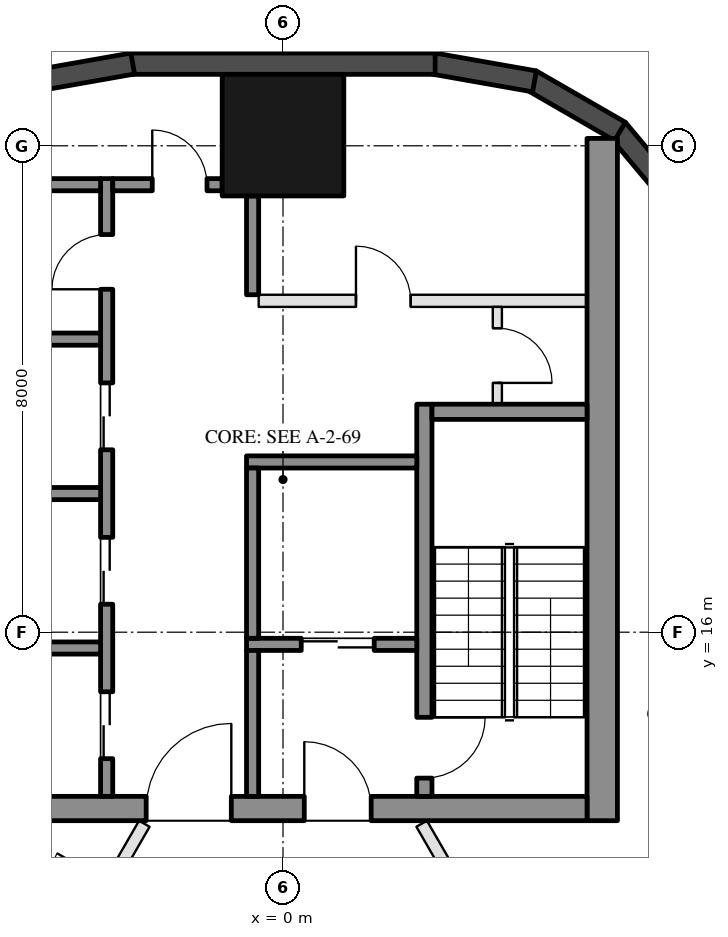
"""IFC4 building model, lengths in metres.
Left out: names, types, materials, properties, quantities, classifications, styles, units other than length and angle.
Written with IfcOpenShell. Run it as: python <this file> out.ifc"""

import sys

from ifc_helpers import new_model, si_unit, direction, frame, frame_2d, origin, origin_2d, place, context, subcontext, project, spatial, rectangle, hollow_rectangle, extrude, boolean, halfspace, element, fill, save


model = new_model("IFC4")
c1 = context("Model", 3, precision=1e-05, world=origin(), true_north=direction((0.0, 1.0)))
c2 = subcontext(c1, "Body", "Model", "MODEL_VIEW")
j1 = project(units=[si_unit("LENGTHUNIT", "METRE"), si_unit("PLANEANGLEUNIT", "RADIAN")], contexts=[c1])
p1 = place(None, origin())
s1 = spatial("IfcSite", under=j1, at=p1, CompositionType="ELEMENT")
p2 = place(p1, origin())
s2 = spatial("IfcBuilding", under=s1, at=p2, CompositionType="ELEMENT")
p3 = place(p2, frame((0.0, 0.0, 298.5)))
s3 = spatial("IfcBuildingStorey", under=s2, at=p3, CompositionType="ELEMENT", Elevation=298.5)
p4 = place(p3, frame((0.0, 24.175, 0.0), z_axis=(0.0, -0.21982618752, 0.975539054718), x_axis=(1.0, 0.0, 0.0)))
e1 = element("IfcColumn", 1, at=p4, inside=s3, PredefinedType="COLUMN", context=c2, shape_type="SweptSolid", body=[
    boolean("DIFFERENCE", boolean("DIFFERENCE", extrude(hollow_rectangle(XDim=2.0, YDim=2.0, WallThickness=0.05, at=origin_2d()), origin(), (0.0, 0.0, 1.0), 3.793), halfspace(frame((0.0, 0.0, 0.113), z_axis=(0.0, 0.0, 1.0), x_axis=(1.0, 0.0, 0.0)), True)), halfspace(frame((0.0, 0.0, 3.679), z_axis=(0.0, 0.0, 1.0), x_axis=(1.0, 0.0, 0.0)), False)),
])
for number, where, z_axis, x_axis in (
    (2, (6.581, 22.98, 0.0), (0.0, 0.0, 1.0), (-0.643, 0.766, 0.0)),
    (3, (5.542, 24.236, 0.0), (0.0, 0.0, 1.0), (-0.866, 0.5, 0.0)),
    (4, (4.135, 25.059, 0.0), (0.0, 0.0, 1.0), (-0.985, 0.174, 0.0)),
):
    element("IfcWall", number, at=place(p3, frame(where, z_axis=z_axis, x_axis=x_axis)), inside=s3, PredefinedType="SOLIDWALL", context=c2, shape_type="SweptSolid", body=[
        extrude(rectangle(XDim=1.689, YDim=0.35, at=frame_2d((0.845, 0.0))), origin(), (0.0, 0.0, 1.0), 3.55),
    ])
p5 = place(p3, frame((2.502, 25.35, 0.0), z_axis=(0.0, 0.0, 1.0), x_axis=(-1.0, 0.0, 0.0)))
e5 = element("IfcWall", 5, at=p5, inside=s3, PredefinedType="SOLIDWALL", context=c2, shape_type="SweptSolid", body=[
    extrude(rectangle(XDim=5.004, YDim=0.35, at=frame_2d((2.502, 0.0))), origin(), (0.0, 0.0, 1.0), 3.55),
])
p6 = place(p3, frame((-2.472, 25.353, 0.0), z_axis=(0.0, 0.0, 1.0), x_axis=(-0.984799556842, -0.173694654046, 0.0)))
e6 = element("IfcWall", 6, at=p6, inside=s3, PredefinedType="SOLIDWALL", context=c2, shape_type="SweptSolid", body=[
    extrude(rectangle(XDim=1.689, YDim=0.35, at=frame_2d((0.845, 0.0))), origin(), (0.0, 0.0, 1.0), 3.55),
])
p7 = place(p3, frame((5.25, 12.9, 0.0), z_axis=(0.0, 0.0, 1.0), x_axis=(0.0, 1.0, 0.0)))
e7 = element("IfcWall", 7, at=p7, inside=s3, PredefinedType="SHEAR", context=c2, shape_type="SweptSolid", body=[
    extrude(rectangle(XDim=11.222, YDim=0.5, at=frame_2d((5.611, 0.0))), origin(), (0.0, 0.0, 1.0), 3.5),
])
p8 = place(p3, frame((5.0, 13.1, 0.0), z_axis=(0.0, 0.0, 1.0), x_axis=(-1.0, 0.0, 0.0)))
e8 = element("IfcWall", 8, at=p8, inside=s3, PredefinedType="SHEAR", context=c2, shape_type="SweptSolid", body=[
    extrude(rectangle(XDim=10.0, YDim=0.4, at=frame_2d((5.0, 0.0))), origin(), (0.0, 0.0, 1.0), 3.5),
])
p9 = place(p8, frame((3.55, 0.0, 0.0)))
e9 = element("IfcOpeningElement", 9, at=p9, cuts=e8, PredefinedType="OPENING", context=c2, shape_type="SweptSolid", body=[
    extrude(rectangle(XDim=1.1, YDim=2.1, at=frame_2d((0.55, 1.05))), frame((0.0, 0.21, 0.0), z_axis=(0.0, -1.0, 0.0), x_axis=(1.0, 0.0, 0.0)), (0.0, 0.0, 1.0), 0.42),
])
p10 = place(p8, frame((5.85, 0.0, 0.0)))
e10 = element("IfcOpeningElement", 10, at=p10, cuts=e8, PredefinedType="OPENING", context=c2, shape_type="SweptSolid", body=[
    extrude(rectangle(XDim=1.4, YDim=2.1, at=frame_2d((0.7, 1.05))), frame((0.0, 0.21, 0.0), z_axis=(0.0, -1.0, 0.0), x_axis=(1.0, 0.0, 0.0)), (0.0, 0.0, 1.0), 0.42),
])
p11 = place(p3, frame((2.325, 13.3, 0.0), z_axis=(0.0, 0.0, 1.0), x_axis=(0.0, 1.0, 0.0)))
e11 = element("IfcWall", 11, at=p11, inside=s3, PredefinedType="SHEAR", context=c2, shape_type="SweptSolid", body=[
    extrude(rectangle(XDim=6.45, YDim=0.25, at=frame_2d((3.225, 0.0))), origin(), (0.0, 0.0, 1.0), 3.5),
])
p12 = place(p11, frame((0.3, 0.0, 0.0)))
e12 = element("IfcOpeningElement", 12, at=p12, cuts=e11, PredefinedType="OPENING", context=c2, shape_type="SweptSolid", body=[
    extrude(rectangle(XDim=1.0, YDim=2.1, at=frame_2d((0.5, 1.05))), frame((0.0, 0.135, 0.0), z_axis=(0.0, -1.0, 0.0), x_axis=(1.0, 0.0, 0.0)), (0.0, 0.0, 1.0), 0.27),
])
p13 = place(p3, frame((5.0, 19.625, 0.0), z_axis=(0.0, 0.0, 1.0), x_axis=(-1.0, 0.0, 0.0)))
e13 = element("IfcWall", 13, at=p13, inside=s3, PredefinedType="SHEAR", context=c2, shape_type="SweptSolid", body=[
    extrude(rectangle(XDim=2.55, YDim=0.25, at=frame_2d((1.275, 0.0))), origin(), (0.0, 0.0, 1.0), 3.5),
])
p14 = place(p3, frame((2.2, 18.8, 0.0), z_axis=(0.0, 0.0, 1.0), x_axis=(-1.0, 0.0, 0.0)))
e14 = element("IfcWall", 14, at=p14, inside=s3, PredefinedType="SHEAR", context=c2, shape_type="SweptSolid", body=[
    extrude(rectangle(XDim=2.8, YDim=0.2, at=frame_2d((1.4, 0.0))), origin(), (0.0, 0.0, 1.0), 3.5),
])
p15 = place(p3, frame((2.2, 15.8, 0.0), z_axis=(0.0, 0.0, 1.0), x_axis=(-1.0, 0.0, 0.0)))
e15 = element("IfcWall", 15, at=p15, inside=s3, PredefinedType="SHEAR", context=c2, shape_type="SweptSolid", body=[
    extrude(rectangle(XDim=2.8, YDim=0.2, at=frame_2d((1.4, 0.0))), origin(), (0.0, 0.0, 1.0), 3.5),
])
p16 = place(p15, frame((0.7, 0.0, 0.0)))
e16 = element("IfcOpeningElement", 16, at=p16, cuts=e15, PredefinedType="OPENING", context=c2, shape_type="SweptSolid", body=[
    extrude(rectangle(XDim=1.2, YDim=2.1, at=frame_2d((0.6, 1.05))), frame((0.0, 0.11, 0.0), z_axis=(0.0, -1.0, 0.0), x_axis=(1.0, 0.0, 0.0)), (0.0, 0.0, 1.0), 0.22),
])
p17 = place(p3, frame((-0.5, 15.9, 0.0), z_axis=(0.0, 0.0, 1.0), x_axis=(0.0, 1.0, 0.0)))
e17 = element("IfcWall", 17, at=p17, inside=s3, PredefinedType="SHEAR", context=c2, shape_type="SweptSolid", body=[
    extrude(rectangle(XDim=2.8, YDim=0.2, at=frame_2d((1.4, 0.0))), origin(), (0.0, 0.0, 1.0), 3.5),
])
p18 = place(p3, frame((-0.5, 13.3, 0.0), z_axis=(0.0, 0.0, 1.0), x_axis=(0.0, 1.0, 0.0)))
e18 = element("IfcWall", 18, at=p18, inside=s3, PredefinedType="SHEAR", context=c2, shape_type="SweptSolid", body=[
    extrude(rectangle(XDim=2.4, YDim=0.2, at=frame_2d((1.2, 0.0))), origin(), (0.0, 0.0, 1.0), 3.5),
])
p19 = place(p3, frame((-2.9, 13.3, 0.0), z_axis=(0.0, 0.0, 1.0), x_axis=(0.0, 1.0, 0.0)))
e19 = element("IfcWall", 19, at=p19, inside=s3, PredefinedType="SHEAR", context=c2, shape_type="SweptSolid", body=[
    extrude(rectangle(XDim=10.16, YDim=0.2, at=frame_2d((5.08, 0.0))), origin(), (0.0, 0.0, 1.0), 3.5),
])
p20 = place(p19, frame((0.62, 0.0, 0.0)))
e20 = element("IfcOpeningElement", 20, at=p20, cuts=e19, PredefinedType="OPENING", context=c2, shape_type="SweptSolid", body=[
    extrude(rectangle(XDim=1.1, YDim=2.1, at=frame_2d((0.55, 1.05))), frame((0.0, 0.11, 0.0), z_axis=(0.0, -1.0, 0.0), x_axis=(1.0, 0.0, 0.0)), (0.0, 0.0, 1.0), 0.22),
])
p21 = place(p19, frame((3.16, 0.0, 0.0)))
e21 = element("IfcOpeningElement", 21, at=p21, cuts=e19, PredefinedType="OPENING", context=c2, shape_type="SweptSolid", body=[
    extrude(rectangle(XDim=1.1, YDim=2.1, at=frame_2d((0.55, 1.05))), frame((0.0, 0.11, 0.0), z_axis=(0.0, -1.0, 0.0), x_axis=(1.0, 0.0, 0.0)), (0.0, 0.0, 1.0), 0.22),
])
p22 = place(p19, frame((5.7, 0.0, 0.0)))
e22 = element("IfcOpeningElement", 22, at=p22, cuts=e19, PredefinedType="OPENING", context=c2, shape_type="SweptSolid", body=[
    extrude(rectangle(XDim=1.1, YDim=2.1, at=frame_2d((0.55, 1.05))), frame((0.0, 0.11, 0.0), z_axis=(0.0, -1.0, 0.0), x_axis=(1.0, 0.0, 0.0)), (0.0, 0.0, 1.0), 0.22),
])
p23 = place(p19, frame((8.34, 0.0, 0.0)))
e23 = element("IfcOpeningElement", 23, at=p23, cuts=e19, PredefinedType="OPENING", context=c2, shape_type="SweptSolid", body=[
    extrude(rectangle(XDim=0.9, YDim=2.1, at=frame_2d((0.45, 1.05))), frame((0.0, 0.11, 0.0), z_axis=(0.0, -1.0, 0.0), x_axis=(1.0, 0.0, 0.0)), (0.0, 0.0, 1.0), 0.22),
])
p24 = place(p3, frame((-1.0, 23.36, 0.0), z_axis=(0.0, 0.0, 1.0), x_axis=(-1.0, 0.0, 0.0)))
e24 = element("IfcWall", 24, at=p24, inside=s3, PredefinedType="SHEAR", context=c2, shape_type="SweptSolid", body=[
    extrude(rectangle(XDim=1.8, YDim=0.2, at=frame_2d((0.9, 0.0))), origin(), (0.0, 0.0, 1.0), 3.5),
])
p25 = place(p24, frame((0.25, 0.0, 0.0)))
e25 = element("IfcOpeningElement", 25, at=p25, cuts=e24, PredefinedType="OPENING", context=c2, shape_type="SweptSolid", body=[
    extrude(rectangle(XDim=0.9, YDim=2.1, at=frame_2d((0.45, 1.05))), frame((0.0, 0.11, 0.0), z_axis=(0.0, -1.0, 0.0), x_axis=(1.0, 0.0, 0.0)), (0.0, 0.0, 1.0), 0.22),
])
p26 = place(p3, frame((-0.5, 21.55, 0.0), z_axis=(0.0, 0.0, 1.0), x_axis=(0.0, 1.0, 0.0)))
e26 = element("IfcWall", 26, at=p26, inside=s3, PredefinedType="SHEAR", context=c2, shape_type="SweptSolid", body=[
    extrude(rectangle(XDim=1.625, YDim=0.2, at=frame_2d((0.812, 0.0))), origin(), (0.0, 0.0, 1.0), 3.5),
])
for number, where, z_axis, x_axis in (
    (27, (-3.0, 15.74, 0.0), (0.0, 0.0, 1.0), (-1.0, 0.0, 0.0)),
    (28, (-3.0, 18.28, 0.0), (0.0, 0.0, 1.0), (-1.0, 0.0, 0.0)),
    (29, (-3.0, 20.82, 0.0), (0.0, 0.0, 1.0), (-1.0, 0.0, 0.0)),
    (30, (-3.0, 23.36, 0.0), (0.0, 0.0, 1.0), (-1.0, 0.0, 0.0)),
):
    element("IfcWall", number, at=place(p3, frame(where, z_axis=z_axis, x_axis=x_axis)), inside=s3, PredefinedType="SHEAR", context=c2, shape_type="SweptSolid", body=[
        extrude(rectangle(XDim=2.0, YDim=0.2, at=frame_2d((1.0, 0.0))), origin(), (0.0, 0.0, 1.0), 3.5),
    ])
p27 = place(p3, frame((5.0, 21.45, 0.0), z_axis=(0.0, 0.0, 1.0), x_axis=(-1.0, 0.0, 0.0)))
e31 = element("IfcWall", 31, at=p27, inside=s3, PredefinedType="PARTITIONING", context=c2, shape_type="SweptSolid", body=[
    extrude(rectangle(XDim=5.4, YDim=0.2, at=frame_2d((2.7, 0.0))), origin(), (0.0, 0.0, 1.0), 3.5),
])
p28 = place(p27, frame((2.9, 0.0, 0.0)))
e32 = element("IfcOpeningElement", 32, at=p28, cuts=e31, PredefinedType="OPENING", context=c2, shape_type="SweptSolid", body=[
    extrude(rectangle(XDim=0.9, YDim=2.1, at=frame_2d((0.45, 1.05))), frame((0.0, 0.11, 0.0), z_axis=(0.0, -1.0, 0.0), x_axis=(1.0, 0.0, 0.0)), (0.0, 0.0, 1.0), 0.22),
])
p29 = place(p3, frame((3.525, 19.75, 0.0), z_axis=(0.0, 0.0, 1.0), x_axis=(0.0, 1.0, 0.0)))
e33 = element("IfcWall", 33, at=p29, inside=s3, PredefinedType="PARTITIONING", context=c2, shape_type="SweptSolid", body=[
    extrude(rectangle(XDim=1.6, YDim=0.15, at=frame_2d((0.8, 0.0))), origin(), (0.0, 0.0, 1.0), 3.5),
])
p30 = place(p29, frame((0.35, 0.0, 0.0)))
e34 = element("IfcOpeningElement", 34, at=p30, cuts=e33, PredefinedType="OPENING", context=c2, shape_type="SweptSolid", body=[
    extrude(rectangle(XDim=0.9, YDim=2.1, at=frame_2d((0.45, 1.05))), frame((0.0, 0.085, 0.0), z_axis=(0.0, -1.0, 0.0), x_axis=(1.0, 0.0, 0.0)), (0.0, 0.0, 1.0), 0.17),
])
p31 = place(p3, frame((2.281, 12.85, 0.0), z_axis=(0.0, 0.0, 1.0), x_axis=(0.499976409294, -0.866039023456, 0.0)))
e35 = element("IfcWall", 35, at=p31, inside=s3, PredefinedType="PARTITIONING", context=c2, shape_type="SweptSolid", body=[
    extrude(rectangle(XDim=6.186, YDim=0.2, at=frame_2d((3.093, 0.0))), origin(), (0.0, 0.0, 1.0), 3.1),
])
p32 = place(p31, frame((2.738, 0.0, 0.0)))
e36 = element("IfcOpeningElement", 36, at=p32, cuts=e35, PredefinedType="OPENING", context=c2, shape_type="SweptSolid", body=[
    extrude(rectangle(XDim=1.0, YDim=2.1, at=frame_2d((0.5, 1.05))), frame((0.0, 0.11, 0.0), z_axis=(0.0, -1.0, 0.0), x_axis=(1.0, 0.0, 0.0)), (0.0, 0.0, 1.0), 0.22),
])
p33 = place(p3, frame((-4.575, 8.876, 0.0), z_axis=(0.0, 0.0, 1.0), x_axis=(0.50000187635, 0.866024320471, 0.0)))
e37 = element("IfcWall", 37, at=p33, inside=s3, PredefinedType="PARTITIONING", context=c2, shape_type="SweptSolid", body=[
    extrude(rectangle(XDim=4.588, YDim=0.2, at=frame_2d((2.294, 0.0))), origin(), (0.0, 0.0, 1.0), 3.1),
])
p34 = place(p33, frame((2.45, 0.0, 0.0)))
e38 = element("IfcOpeningElement", 38, at=p34, cuts=e37, PredefinedType="OPENING", context=c2, shape_type="SweptSolid", body=[
    extrude(rectangle(XDim=1.0, YDim=2.1, at=frame_2d((0.5, 1.05))), frame((0.0, 0.11, 0.0), z_axis=(0.0, -1.0, 0.0), x_axis=(1.0, 0.0, 0.0)), (0.0, 0.0, 1.0), 0.22),
])
p35 = place(p16, origin())
e39 = element("IfcDoor", 39, at=p35, inside=s3, OperationType="DOUBLE_DOOR_SLIDING", PredefinedType="DOOR", context=c2, shape_type="SweptSolid", body=[
    extrude(rectangle(XDim=1.2, YDim=2.1, at=frame_2d((0.6, 1.05))), frame((0.0, 0.025, 0.0), z_axis=(0.0, -1.0, 0.0), x_axis=(1.0, 0.0, 0.0)), (0.0, 0.0, 1.0), 0.05),
])
fill(e16, e39)
p36 = place(p30, frame((0.9, 0.0, 0.0), z_axis=(0.0, 0.0, 1.0), x_axis=(-1.0, 0.0, 0.0)))
e40 = element("IfcDoor", 40, at=p36, inside=s3, OperationType="SINGLE_SWING_RIGHT", PredefinedType="DOOR", context=c2, shape_type="SweptSolid", body=[
    extrude(rectangle(XDim=0.9, YDim=2.1, at=frame_2d((0.45, 1.05))), frame((0.0, 0.025, 0.0), z_axis=(0.0, -1.0, 0.0), x_axis=(1.0, 0.0, 0.0)), (0.0, 0.0, 1.0), 0.05),
])
fill(e34, e40)
p37 = place(p20, origin())
e41 = element("IfcDoor", 41, at=p37, inside=s3, OperationType="DOUBLE_DOOR_SLIDING", PredefinedType="DOOR", context=c2, shape_type="SweptSolid", body=[
    extrude(rectangle(XDim=1.1, YDim=2.1, at=frame_2d((0.55, 1.05))), frame((0.0, 0.025, 0.0), z_axis=(0.0, -1.0, 0.0), x_axis=(1.0, 0.0, 0.0)), (0.0, 0.0, 1.0), 0.05),
])
fill(e20, e41)
p38 = place(p21, origin())
e42 = element("IfcDoor", 42, at=p38, inside=s3, OperationType="DOUBLE_DOOR_SLIDING", PredefinedType="DOOR", context=c2, shape_type="SweptSolid", body=[
    extrude(rectangle(XDim=1.1, YDim=2.1, at=frame_2d((0.55, 1.05))), frame((0.0, 0.025, 0.0), z_axis=(0.0, -1.0, 0.0), x_axis=(1.0, 0.0, 0.0)), (0.0, 0.0, 1.0), 0.05),
])
fill(e21, e42)
p39 = place(p22, origin())
e43 = element("IfcDoor", 43, at=p39, inside=s3, OperationType="DOUBLE_DOOR_SLIDING", PredefinedType="DOOR", context=c2, shape_type="SweptSolid", body=[
    extrude(rectangle(XDim=1.1, YDim=2.1, at=frame_2d((0.55, 1.05))), frame((0.0, 0.025, 0.0), z_axis=(0.0, -1.0, 0.0), x_axis=(1.0, 0.0, 0.0)), (0.0, 0.0, 1.0), 0.05),
])
fill(e22, e43)
p40 = place(p23, origin())
e44 = element("IfcDoor", 44, at=p40, inside=s3, OperationType="SINGLE_SWING_LEFT", PredefinedType="DOOR", context=c2, shape_type="SweptSolid", body=[
    extrude(rectangle(XDim=0.9, YDim=2.1, at=frame_2d((0.45, 1.05))), frame((0.0, 0.025, 0.0), z_axis=(0.0, -1.0, 0.0), x_axis=(1.0, 0.0, 0.0)), (0.0, 0.0, 1.0), 0.05),
])
fill(e23, e44)
p41 = place(p25, frame((0.9, 0.0, 0.0), z_axis=(0.0, 0.0, 1.0), x_axis=(-1.0, 0.0, 0.0)))
e45 = element("IfcDoor", 45, at=p41, inside=s3, OperationType="SINGLE_SWING_LEFT", PredefinedType="DOOR", context=c2, shape_type="SweptSolid", body=[
    extrude(rectangle(XDim=0.9, YDim=2.1, at=frame_2d((0.45, 1.05))), frame((0.0, 0.025, 0.0), z_axis=(0.0, -1.0, 0.0), x_axis=(1.0, 0.0, 0.0)), (0.0, 0.0, 1.0), 0.05),
])
fill(e25, e45)
p42 = place(p28, frame((0.9, 0.0, 0.0), z_axis=(0.0, 0.0, 1.0), x_axis=(-1.0, 0.0, 0.0)))
e46 = element("IfcDoor", 46, at=p42, inside=s3, OperationType="SINGLE_SWING_LEFT", PredefinedType="DOOR", context=c2, shape_type="SweptSolid", body=[
    extrude(rectangle(XDim=0.9, YDim=2.1, at=frame_2d((0.45, 1.05))), frame((0.0, 0.025, 0.0), z_axis=(0.0, -1.0, 0.0), x_axis=(1.0, 0.0, 0.0)), (0.0, 0.0, 1.0), 0.05),
])
fill(e32, e46)
p43 = place(p9, frame((1.1, 0.0, 0.0), z_axis=(0.0, 0.0, 1.0), x_axis=(-1.0, 0.0, 0.0)))
e47 = element("IfcDoor", 47, at=p43, inside=s3, OperationType="SINGLE_SWING_LEFT", PredefinedType="DOOR", context=c2, shape_type="SweptSolid", body=[
    extrude(rectangle(XDim=1.1, YDim=2.1, at=frame_2d((0.55, 1.05))), frame((0.0, 0.025, 0.0), z_axis=(0.0, -1.0, 0.0), x_axis=(1.0, 0.0, 0.0)), (0.0, 0.0, 1.0), 0.05),
])
fill(e9, e47)
p44 = place(p10, frame((1.4, 0.0, 0.0), z_axis=(0.0, 0.0, 1.0), x_axis=(-1.0, 0.0, 0.0)))
e48 = element("IfcDoor", 48, at=p44, inside=s3, OperationType="DOUBLE_DOOR_SINGLE_SWING", PredefinedType="DOOR", context=c2, shape_type="SweptSolid", body=[
    extrude(rectangle(XDim=1.4, YDim=2.1, at=frame_2d((0.7, 1.05))), frame((0.0, 0.025, 0.0), z_axis=(0.0, -1.0, 0.0), x_axis=(1.0, 0.0, 0.0)), (0.0, 0.0, 1.0), 0.05),
])
fill(e10, e48)
p45 = place(p12, frame((1.0, 0.0, 0.0), z_axis=(0.0, 0.0, 1.0), x_axis=(-1.0, 0.0, 0.0)))
e49 = element("IfcDoor", 49, at=p45, inside=s3, OperationType="SINGLE_SWING_LEFT", PredefinedType="DOOR", context=c2, shape_type="SweptSolid", body=[
    extrude(rectangle(XDim=1.0, YDim=2.1, at=frame_2d((0.5, 1.05))), frame((0.0, 0.025, 0.0), z_axis=(0.0, -1.0, 0.0), x_axis=(1.0, 0.0, 0.0)), (0.0, 0.0, 1.0), 0.05),
])
fill(e12, e49)
save(model, sys.argv[1])
